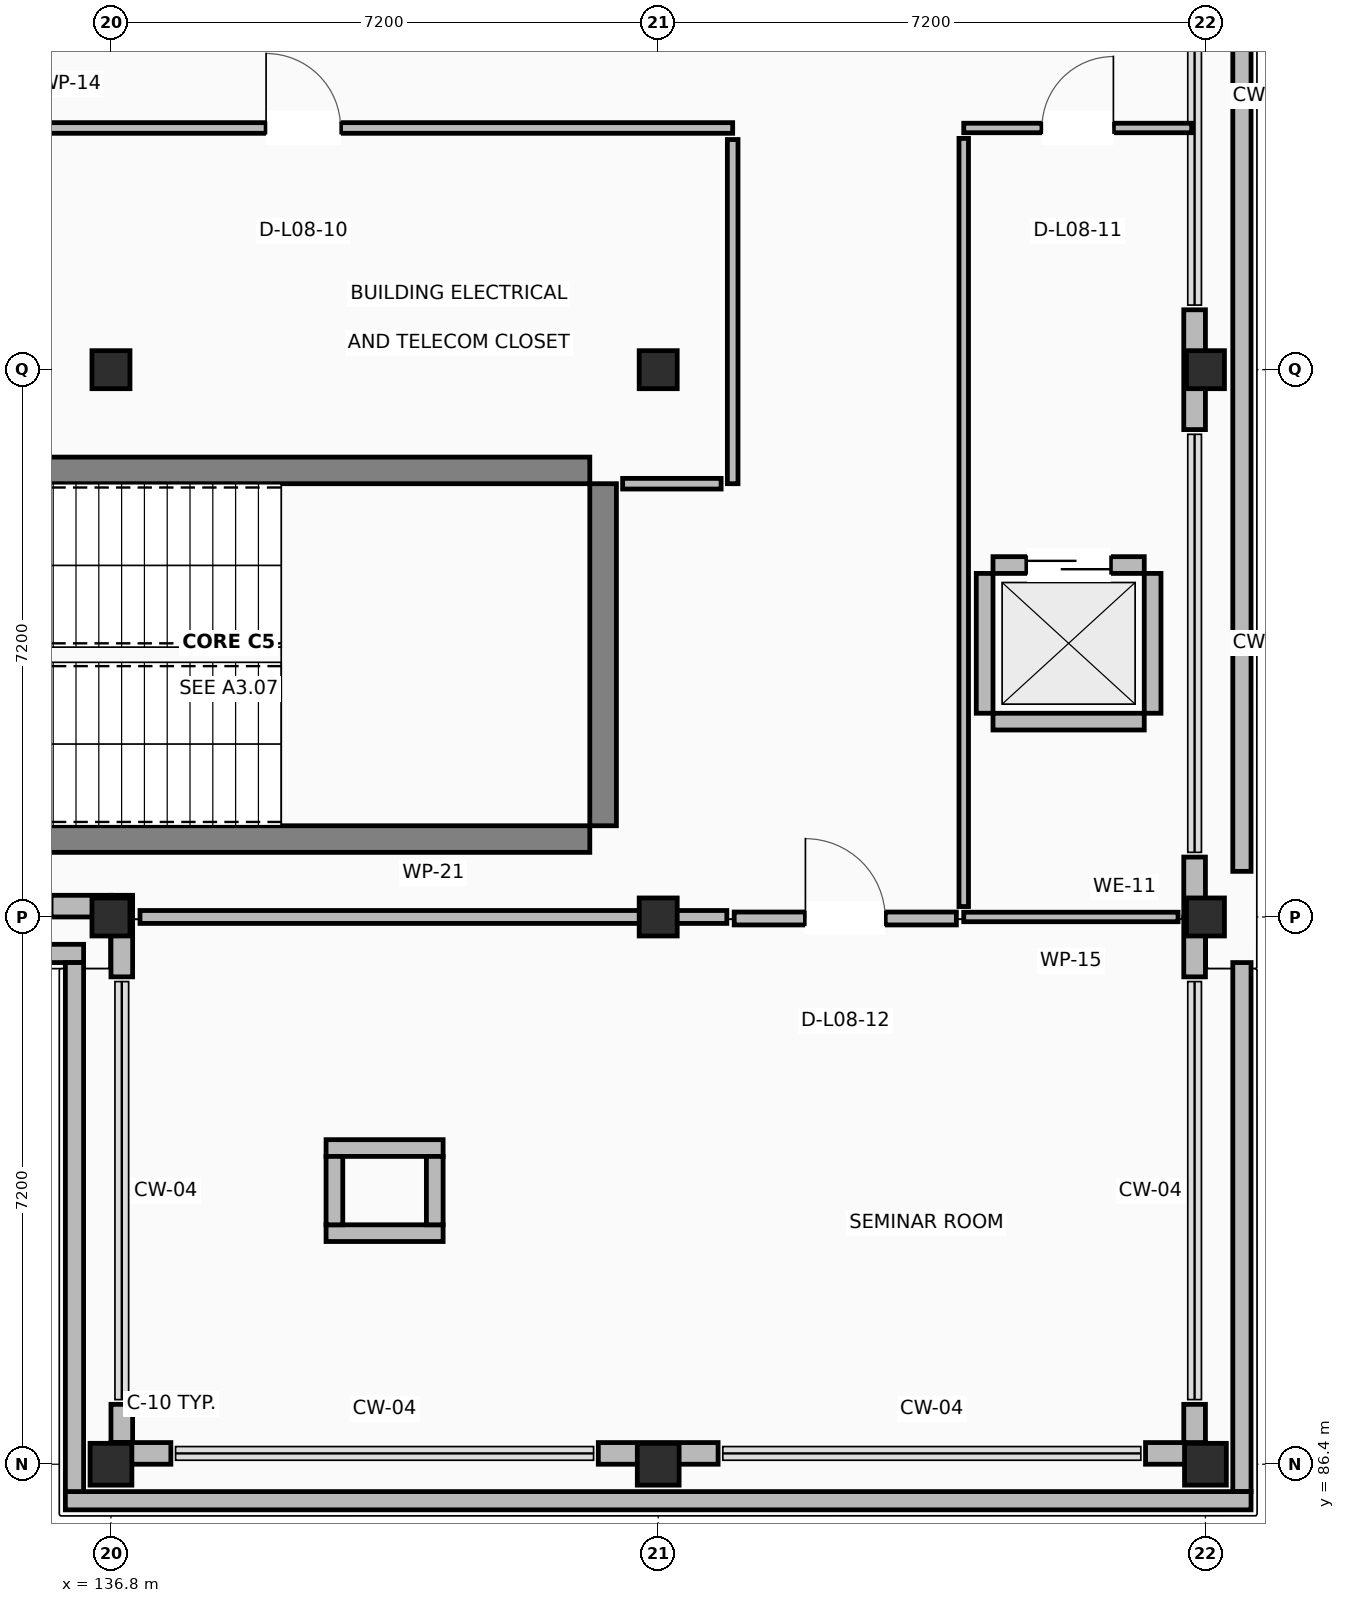
"""IFC4 building model, lengths in metres.
Left out: names, types, materials, properties, quantities, classifications, styles, units other than length and angle.
Written with IfcOpenShell. Run it as: python <this file> out.ifc"""

import sys

from ifc_helpers import new_model, si_unit, direction, frame, frame_2d, origin, origin_2d, place, context, subcontext, project, spatial, rectangle, extrude, element, fill, save


model = new_model("IFC4")
c1 = context("Model", 3, precision=1e-05, world=origin(), true_north=direction((0.0, 1.0)))
c2 = subcontext(c1, "Body", "Model", "MODEL_VIEW")
j1 = project(units=[si_unit("LENGTHUNIT", "METRE"), si_unit("PLANEANGLEUNIT", "RADIAN")], contexts=[c1])
p1 = place(None, origin())
s1 = spatial("IfcSite", under=j1, at=p1, CompositionType="ELEMENT")
p2 = place(p1, origin())
s2 = spatial("IfcBuilding", under=s1, at=p2, CompositionType="ELEMENT")
p3 = place(p2, frame((0.0, 0.0, 35.4)))
s3 = spatial("IfcBuildingStorey", under=s2, at=p3, CompositionType="ELEMENT", Elevation=35.4)
p4 = place(p3, frame((136.8, 86.4, 0.0), z_axis=(0.0, 0.0, 1.0), x_axis=(1.0, 0.0, 0.0)))
e1 = element("IfcColumn", 1, at=p4, inside=s3, PredefinedType="COLUMN", context=c2, shape_type="SweptSolid", body=[
    extrude(rectangle(XDim=0.55, YDim=0.55, at=origin_2d()), origin(), (0.0, 0.0, 1.0), 3.92),
])
for number, where, z_axis, x_axis in (
    (2, (136.8, 93.6, 0.0), (0.0, 0.0, 1.0), (1.0, 0.0, 0.0)),
    (3, (136.8, 100.8, 0.0), (0.0, 0.0, 1.0), (1.0, 0.0, 0.0)),
):
    element("IfcColumn", number, at=place(p3, frame(where, z_axis=z_axis, x_axis=x_axis)), inside=s3, PredefinedType="COLUMN", context=c2, shape_type="SweptSolid", body=[
        extrude(rectangle(XDim=0.5, YDim=0.5, at=origin_2d()), origin(), (0.0, 0.0, 1.0), 3.92),
    ])
p5 = place(p3, frame((144.0, 86.4, 0.0), z_axis=(0.0, 0.0, 1.0), x_axis=(1.0, 0.0, 0.0)))
e4 = element("IfcColumn", 4, at=p5, inside=s3, PredefinedType="COLUMN", context=c2, shape_type="SweptSolid", body=[
    extrude(rectangle(XDim=0.55, YDim=0.55, at=origin_2d()), origin(), (0.0, 0.0, 1.0), 3.92),
])
for number, where, z_axis, x_axis in (
    (5, (144.0, 93.6, 0.0), (0.0, 0.0, 1.0), (1.0, 0.0, 0.0)),
    (6, (144.0, 100.8, 0.0), (0.0, 0.0, 1.0), (1.0, 0.0, 0.0)),
):
    element("IfcColumn", number, at=place(p3, frame(where, z_axis=z_axis, x_axis=x_axis)), inside=s3, PredefinedType="COLUMN", context=c2, shape_type="SweptSolid", body=[
        extrude(rectangle(XDim=0.5, YDim=0.5, at=origin_2d()), origin(), (0.0, 0.0, 1.0), 3.92),
    ])
p6 = place(p3, frame((151.2, 86.4, 0.0), z_axis=(0.0, 0.0, 1.0), x_axis=(1.0, 0.0, 0.0)))
e7 = element("IfcColumn", 7, at=p6, inside=s3, PredefinedType="COLUMN", context=c2, shape_type="SweptSolid", body=[
    extrude(rectangle(XDim=0.55, YDim=0.55, at=origin_2d()), origin(), (0.0, 0.0, 1.0), 3.92),
])
for number, where, z_axis, x_axis in (
    (8, (151.2, 93.6, 0.0), (0.0, 0.0, 1.0), (1.0, 0.0, 0.0)),
    (9, (151.2, 100.8, 0.0), (0.0, 0.0, 1.0), (1.0, 0.0, 0.0)),
):
    element("IfcColumn", number, at=place(p3, frame(where, z_axis=z_axis, x_axis=x_axis)), inside=s3, PredefinedType="COLUMN", context=c2, shape_type="SweptSolid", body=[
        extrude(rectangle(XDim=0.5, YDim=0.5, at=origin_2d()), origin(), (0.0, 0.0, 1.0), 3.92),
    ])
for number, where, z_axis, x_axis in (
    (10, (133.6, 94.625, 0.0), (0.0, 0.0, 1.0), (1.0, 0.0, 0.0)),
    (11, (133.6, 99.475, 0.0), (0.0, 0.0, 1.0), (1.0, 0.0, 0.0)),
):
    element("IfcWall", number, at=place(p3, frame(where, z_axis=z_axis, x_axis=x_axis)), inside=s3, PredefinedType="SHEAR", context=c2, shape_type="SweptSolid", body=[
        extrude(rectangle(XDim=9.5, YDim=0.35, at=frame_2d((4.75, 0.0))), origin(), (0.0, 0.0, 1.0), 3.92),
    ])
p7 = place(p3, frame((143.275, 94.8, 0.0), z_axis=(0.0, 0.0, 1.0), x_axis=(0.0, 1.0, 0.0)))
e12 = element("IfcWall", 12, at=p7, inside=s3, PredefinedType="SHEAR", context=c2, shape_type="SweptSolid", body=[
    extrude(rectangle(XDim=4.5, YDim=0.35, at=frame_2d((2.25, 0.0))), origin(), (0.0, 0.0, 1.0), 3.92),
])
p8 = place(p3, frame((151.058, 93.6, 0.0), z_axis=(0.0, 0.0, 1.0), x_axis=(0.0, 1.0, 0.0)))
e13 = element("IfcWall", 13, at=p8, inside=s3, PredefinedType="STANDARD", context=c2, shape_type="SweptSolid", body=[
    extrude(rectangle(XDim=0.788, YDim=0.285, at=frame_2d((0.394, 0.0))), origin(), (0.0, 0.0, 1.0), 2.96),
])
p9 = place(p3, frame((151.058, 100.012, 0.0), z_axis=(0.0, 0.0, 1.0), x_axis=(0.0, 1.0, 0.0)))
e14 = element("IfcWall", 14, at=p9, inside=s3, PredefinedType="STANDARD", context=c2, shape_type="SweptSolid", body=[
    extrude(rectangle(XDim=1.576, YDim=0.285, at=frame_2d((0.788, 0.0))), origin(), (0.0, 0.0, 1.0), 2.96),
])
p10 = place(p3, frame((136.012, 93.742, 0.0), z_axis=(0.0, 0.0, 1.0), x_axis=(1.0, 0.0, 0.0)))
e15 = element("IfcWall", 15, at=p10, inside=s3, PredefinedType="STANDARD", context=c2, shape_type="SweptSolid", body=[
    extrude(rectangle(XDim=0.788, YDim=0.285, at=frame_2d((0.394, 0.0))), origin(), (0.0, 0.0, 1.0), 2.96),
])
p11 = place(p3, frame((136.942, 93.885, 0.0), z_axis=(0.0, 0.0, 1.0), x_axis=(0.0, -1.0, 0.0)))
e16 = element("IfcWall", 16, at=p11, inside=s3, PredefinedType="STANDARD", context=c2, shape_type="SweptSolid", body=[
    extrude(rectangle(XDim=1.073, YDim=0.285, at=frame_2d((0.537, 0.0))), origin(), (0.0, 0.0, 1.0), 2.96),
])
p12 = place(p3, frame((136.942, 87.188, 0.0), z_axis=(0.0, 0.0, 1.0), x_axis=(0.0, -1.0, 0.0)))
e17 = element("IfcWall", 17, at=p12, inside=s3, PredefinedType="STANDARD", context=c2, shape_type="SweptSolid", body=[
    extrude(rectangle(XDim=0.503, YDim=0.285, at=frame_2d((0.251, 0.0))), origin(), (0.0, 0.0, 1.0), 2.96),
])
p13 = place(p3, frame((136.8, 86.542, 0.0), z_axis=(0.0, 0.0, 1.0), x_axis=(1.0, 0.0, 0.0)))
e18 = element("IfcWall", 18, at=p13, inside=s3, PredefinedType="STANDARD", context=c2, shape_type="SweptSolid", body=[
    extrude(rectangle(XDim=0.788, YDim=0.285, at=frame_2d((0.394, 0.0))), origin(), (0.0, 0.0, 1.0), 2.96),
])
p14 = place(p3, frame((143.212, 86.542, 0.0), z_axis=(0.0, 0.0, 1.0), x_axis=(1.0, 0.0, 0.0)))
e19 = element("IfcWall", 19, at=p14, inside=s3, PredefinedType="STANDARD", context=c2, shape_type="SweptSolid", body=[
    extrude(rectangle(XDim=1.576, YDim=0.285, at=frame_2d((0.788, 0.0))), origin(), (0.0, 0.0, 1.0), 2.96),
])
p15 = place(p3, frame((150.412, 86.542, 0.0), z_axis=(0.0, 0.0, 1.0), x_axis=(1.0, 0.0, 0.0)))
e20 = element("IfcWall", 20, at=p15, inside=s3, PredefinedType="STANDARD", context=c2, shape_type="SweptSolid", body=[
    extrude(rectangle(XDim=0.788, YDim=0.285, at=frame_2d((0.394, 0.0))), origin(), (0.0, 0.0, 1.0), 2.96),
])
p16 = place(p3, frame((151.058, 86.685, 0.0), z_axis=(0.0, 0.0, 1.0), x_axis=(0.0, 1.0, 0.0)))
e21 = element("IfcWall", 21, at=p16, inside=s3, PredefinedType="STANDARD", context=c2, shape_type="SweptSolid", body=[
    extrude(rectangle(XDim=0.503, YDim=0.285, at=frame_2d((0.251, 0.0))), origin(), (0.0, 0.0, 1.0), 2.96),
])
p17 = place(p3, frame((151.058, 92.812, 0.0), z_axis=(0.0, 0.0, 1.0), x_axis=(0.0, 1.0, 0.0)))
e22 = element("IfcWall", 22, at=p17, inside=s3, PredefinedType="STANDARD", context=c2, shape_type="SweptSolid", body=[
    extrude(rectangle(XDim=0.788, YDim=0.285, at=frame_2d((0.394, 0.0))), origin(), (0.0, 0.0, 1.0), 2.96),
])
p18 = place(p3, frame((136.44, 93.12, 0.0), z_axis=(0.0, 0.0, 1.0), x_axis=(-1.0, 0.0, 0.0)))
e23 = element("IfcWall", 23, at=p18, inside=s3, PredefinedType="PARAPET", context=c2, shape_type="SweptSolid", body=[
    extrude(rectangle(XDim=50.64, YDim=0.24, at=frame_2d((25.32, 0.0))), origin(), (0.0, 0.0, 1.0), 1.12),
])
p19 = place(p3, frame((151.68, 115.56, 0.0), z_axis=(0.0, 0.0, 1.0), x_axis=(0.0, -1.0, 0.0)))
e24 = element("IfcWall", 24, at=p19, inside=s3, PredefinedType="PARAPET", context=c2, shape_type="SweptSolid", body=[
    extrude(rectangle(XDim=21.36, YDim=0.24, at=frame_2d((10.68, 0.0))), origin(), (0.0, 0.0, 1.0), 1.12),
])
p20 = place(p3, frame((151.68, 93.0, 0.0), z_axis=(0.0, 0.0, 1.0), x_axis=(0.0, -1.0, 0.0)))
e25 = element("IfcWall", 25, at=p20, inside=s3, PredefinedType="PARAPET", context=c2, shape_type="SweptSolid", body=[
    extrude(rectangle(XDim=6.96, YDim=0.24, at=frame_2d((3.48, 0.0))), origin(), (0.0, 0.0, 1.0), 1.12),
])
p21 = place(p3, frame((151.8, 85.92, 0.0), z_axis=(0.0, 0.0, 1.0), x_axis=(-1.0, 0.0, 0.0)))
e26 = element("IfcWall", 26, at=p21, inside=s3, PredefinedType="PARAPET", context=c2, shape_type="SweptSolid", body=[
    extrude(rectangle(XDim=15.6, YDim=0.24, at=frame_2d((7.8, 0.0))), origin(), (0.0, 0.0, 1.0), 1.12),
])
p22 = place(p3, frame((136.32, 86.04, 0.0), z_axis=(0.0, 0.0, 1.0), x_axis=(0.0, 1.0, 0.0)))
e27 = element("IfcWall", 27, at=p22, inside=s3, PredefinedType="PARAPET", context=c2, shape_type="SweptSolid", body=[
    extrude(rectangle(XDim=6.96, YDim=0.24, at=frame_2d((3.48, 0.0))), origin(), (0.0, 0.0, 1.0), 1.12),
])
p23 = place(p3, frame((148.405, 96.17, 0.0), z_axis=(0.0, 0.0, 1.0), x_axis=(1.0, 0.0, 0.0)))
e28 = element("IfcWall", 28, at=p23, inside=s3, PredefinedType="STANDARD", context=c2, shape_type="SweptSolid", body=[
    extrude(rectangle(XDim=1.99, YDim=0.22, at=frame_2d((0.995, 0.0))), origin(), (0.0, 0.0, 1.0), 2.96),
])
p24 = place(p3, frame((148.405, 98.23, 0.0), z_axis=(0.0, 0.0, 1.0), x_axis=(1.0, 0.0, 0.0)))
e29 = element("IfcWall", 29, at=p24, inside=s3, PredefinedType="STANDARD", context=c2, shape_type="SweptSolid", body=[
    extrude(rectangle(XDim=1.99, YDim=0.22, at=frame_2d((0.995, 0.0))), origin(), (0.0, 0.0, 1.0), 2.96),
])
p25 = place(p24, frame((0.445, 0.0, 0.0)))
e30 = element("IfcOpeningElement", 30, at=p25, cuts=e29, PredefinedType="OPENING", context=c2, shape_type="SweptSolid", body=[
    extrude(rectangle(XDim=1.1, YDim=2.15, at=frame_2d((0.55, 1.075))), frame((0.0, 0.12, 0.0), z_axis=(0.0, -1.0, 0.0), x_axis=(1.0, 0.0, 0.0)), (0.0, 0.0, 1.0), 0.24),
])
for number, where, z_axis, x_axis in (
    (31, (148.295, 96.28, 0.0), (0.0, 0.0, 1.0), (0.0, 1.0, 0.0)),
    (32, (150.505, 96.28, 0.0), (0.0, 0.0, 1.0), (0.0, 1.0, 0.0)),
):
    element("IfcWall", number, at=place(p3, frame(where, z_axis=z_axis, x_axis=x_axis)), inside=s3, PredefinedType="STANDARD", context=c2, shape_type="SweptSolid", body=[
        extrude(rectangle(XDim=1.84, YDim=0.22, at=frame_2d((0.92, 0.0))), origin(), (0.0, 0.0, 1.0), 2.96),
    ])
for number, where, z_axis, x_axis in (
    (33, (139.63, 89.44, 0.0), (0.0, 0.0, 1.0), (1.0, 0.0, 0.0)),
    (34, (139.63, 90.56, 0.0), (0.0, 0.0, 1.0), (1.0, 0.0, 0.0)),
):
    element("IfcWall", number, at=place(p3, frame(where, z_axis=z_axis, x_axis=x_axis)), inside=s3, PredefinedType="STANDARD", context=c2, shape_type="SweptSolid", body=[
        extrude(rectangle(XDim=1.54, YDim=0.22, at=frame_2d((0.77, 0.0))), origin(), (0.0, 0.0, 1.0), 2.96),
    ])
for number, where, z_axis, x_axis in (
    (35, (139.74, 89.55, 0.0), (0.0, 0.0, 1.0), (0.0, 1.0, 0.0)),
    (36, (141.06, 89.55, 0.0), (0.0, 0.0, 1.0), (0.0, 1.0, 0.0)),
):
    element("IfcWall", number, at=place(p3, frame(where, z_axis=z_axis, x_axis=x_axis)), inside=s3, PredefinedType="STANDARD", context=c2, shape_type="SweptSolid", body=[
        extrude(rectangle(XDim=0.9, YDim=0.22, at=frame_2d((0.45, 0.0))), origin(), (0.0, 0.0, 1.0), 2.96),
    ])
p26 = place(p3, frame((133.682, 103.98, 0.0), z_axis=(0.0, 0.0, 1.0), x_axis=(1.0, 0.0, 0.0)))
e37 = element("IfcWall", 37, at=p26, inside=s3, PredefinedType="PARTITIONING", context=c2, shape_type="SweptSolid", body=[
    extrude(rectangle(XDim=11.298, YDim=0.14, at=frame_2d((5.649, 0.0))), origin(), (0.0, 0.0, 1.0), 2.96),
])
p27 = place(p26, frame((5.159, 0.0, 0.0)))
e38 = element("IfcOpeningElement", 38, at=p27, cuts=e37, PredefinedType="OPENING", context=c2, shape_type="SweptSolid", body=[
    extrude(rectangle(XDim=0.98, YDim=2.1, at=frame_2d((0.49, 1.05))), frame((0.0, 0.08, 0.0), z_axis=(0.0, -1.0, 0.0), x_axis=(1.0, 0.0, 0.0)), (0.0, 0.0, 1.0), 0.16),
])
p28 = place(p3, frame((144.98, 103.828, 0.0), z_axis=(0.0, 0.0, 1.0), x_axis=(0.0, -1.0, 0.0)))
e39 = element("IfcWall", 39, at=p28, inside=s3, PredefinedType="PARTITIONING", context=c2, shape_type="SweptSolid", body=[
    extrude(rectangle(XDim=4.528, YDim=0.14, at=frame_2d((2.264, 0.0))), origin(), (0.0, 0.0, 1.0), 2.96),
])
p29 = place(p3, frame((144.828, 99.3, 0.0), z_axis=(0.0, 0.0, 1.0), x_axis=(-1.0, 0.0, 0.0)))
e40 = element("IfcWall", 40, at=p29, inside=s3, PredefinedType="PARTITIONING", context=c2, shape_type="SweptSolid", body=[
    extrude(rectangle(XDim=1.296, YDim=0.14, at=frame_2d((0.648, 0.0))), origin(), (0.0, 0.0, 1.0), 2.96),
])
p30 = place(p3, frame((148.02, 103.98, 0.0), z_axis=(0.0, 0.0, 1.0), x_axis=(1.0, 0.0, 0.0)))
e41 = element("IfcWall", 41, at=p30, inside=s3, PredefinedType="PARTITIONING", context=c2, shape_type="SweptSolid", body=[
    extrude(rectangle(XDim=2.998, YDim=0.125, at=frame_2d((1.499, 0.0))), origin(), (0.0, 0.0, 1.0), 2.96),
])
p31 = place(p30, frame((1.029, 0.0, 0.0)))
e42 = element("IfcOpeningElement", 42, at=p31, cuts=e41, PredefinedType="OPENING", context=c2, shape_type="SweptSolid", body=[
    extrude(rectangle(XDim=0.94, YDim=2.1, at=frame_2d((0.47, 1.05))), frame((0.0, 0.073, 0.0), z_axis=(0.0, -1.0, 0.0), x_axis=(1.0, 0.0, 0.0)), (0.0, 0.0, 1.0), 0.145),
])
p32 = place(p3, frame((150.84, 93.6, 0.0), z_axis=(0.0, 0.0, 1.0), x_axis=(-1.0, 0.0, 0.0)))
e43 = element("IfcWall", 43, at=p32, inside=s3, PredefinedType="PARTITIONING", context=c2, shape_type="SweptSolid", body=[
    extrude(rectangle(XDim=2.82, YDim=0.125, at=frame_2d((1.41, 0.0))), origin(), (0.0, 0.0, 1.0), 2.96),
])
p33 = place(p3, frame((148.02, 93.737, 0.0), z_axis=(0.0, 0.0, 1.0), x_axis=(0.0, 1.0, 0.0)))
e44 = element("IfcWall", 44, at=p33, inside=s3, PredefinedType="PARTITIONING", context=c2, shape_type="SweptSolid", body=[
    extrude(rectangle(XDim=10.106, YDim=0.125, at=frame_2d((5.053, 0.0))), origin(), (0.0, 0.0, 1.0), 2.96),
])
p34 = place(p3, frame((145.0, 93.58, 0.0), z_axis=(0.0, 0.0, 1.0), x_axis=(1.0, 0.0, 0.0)))
e45 = element("IfcWall", 45, at=p34, inside=s3, PredefinedType="PARTITIONING", context=c2, shape_type="SweptSolid", body=[
    extrude(rectangle(XDim=2.923, YDim=0.17, at=frame_2d((1.461, 0.0))), origin(), (0.0, 0.0, 1.0), 2.96),
])
p35 = place(p34, frame((0.937, 0.0, 0.0)))
e46 = element("IfcOpeningElement", 46, at=p35, cuts=e45, PredefinedType="OPENING", context=c2, shape_type="SweptSolid", body=[
    extrude(rectangle(XDim=1.05, YDim=2.15, at=frame_2d((0.525, 1.075))), frame((0.0, 0.095, 0.0), z_axis=(0.0, -1.0, 0.0), x_axis=(1.0, 0.0, 0.0)), (0.0, 0.0, 1.0), 0.19),
])
p36 = place(p3, frame((137.182, 93.6, 0.0), z_axis=(0.0, 0.0, 1.0), x_axis=(1.0, 0.0, 0.0)))
e47 = element("IfcWall", 47, at=p36, inside=s3, PredefinedType="PARTITIONING", context=c2, shape_type="SweptSolid", body=[
    extrude(rectangle(XDim=7.721, YDim=0.17, at=frame_2d((3.861, 0.0))), origin(), (0.0, 0.0, 1.0), 2.96),
])
p37 = place(p25, origin())
e48 = element("IfcDoor", 48, at=p37, inside=s3, OperationType="SLIDING_TO_LEFT", PredefinedType="DOOR", context=c2, shape_type="SweptSolid", body=[
    extrude(rectangle(XDim=1.1, YDim=2.15, at=frame_2d((0.55, 1.075))), frame((0.0, 0.025, 0.0), z_axis=(0.0, -1.0, 0.0), x_axis=(1.0, 0.0, 0.0)), (0.0, 0.0, 1.0), 0.05),
])
fill(e30, e48)
p38 = place(p27, origin())
e49 = element("IfcDoor", 49, at=p38, inside=s3, OperationType="SINGLE_SWING_LEFT", PredefinedType="DOOR", context=c2, shape_type="SweptSolid", body=[
    extrude(rectangle(XDim=0.98, YDim=2.1, at=frame_2d((0.49, 1.05))), frame((0.0, 0.025, 0.0), z_axis=(0.0, -1.0, 0.0), x_axis=(1.0, 0.0, 0.0)), (0.0, 0.0, 1.0), 0.05),
])
fill(e38, e49)
p39 = place(p31, origin())
e50 = element("IfcDoor", 50, at=p39, inside=s3, OperationType="SINGLE_SWING_RIGHT", PredefinedType="DOOR", context=c2, shape_type="SweptSolid", body=[
    extrude(rectangle(XDim=0.94, YDim=2.1, at=frame_2d((0.47, 1.05))), frame((0.0, 0.025, 0.0), z_axis=(0.0, -1.0, 0.0), x_axis=(1.0, 0.0, 0.0)), (0.0, 0.0, 1.0), 0.05),
])
fill(e42, e50)
p40 = place(p35, origin())
e51 = element("IfcDoor", 51, at=p40, inside=s3, OperationType="SINGLE_SWING_LEFT", PredefinedType="DOOR", context=c2, shape_type="SweptSolid", body=[
    extrude(rectangle(XDim=1.05, YDim=2.15, at=frame_2d((0.525, 1.075))), frame((0.0, 0.025, 0.0), z_axis=(0.0, -1.0, 0.0), x_axis=(1.0, 0.0, 0.0)), (0.0, 0.0, 1.0), 0.05),
])
fill(e46, e51)
save(model, sys.argv[1])
